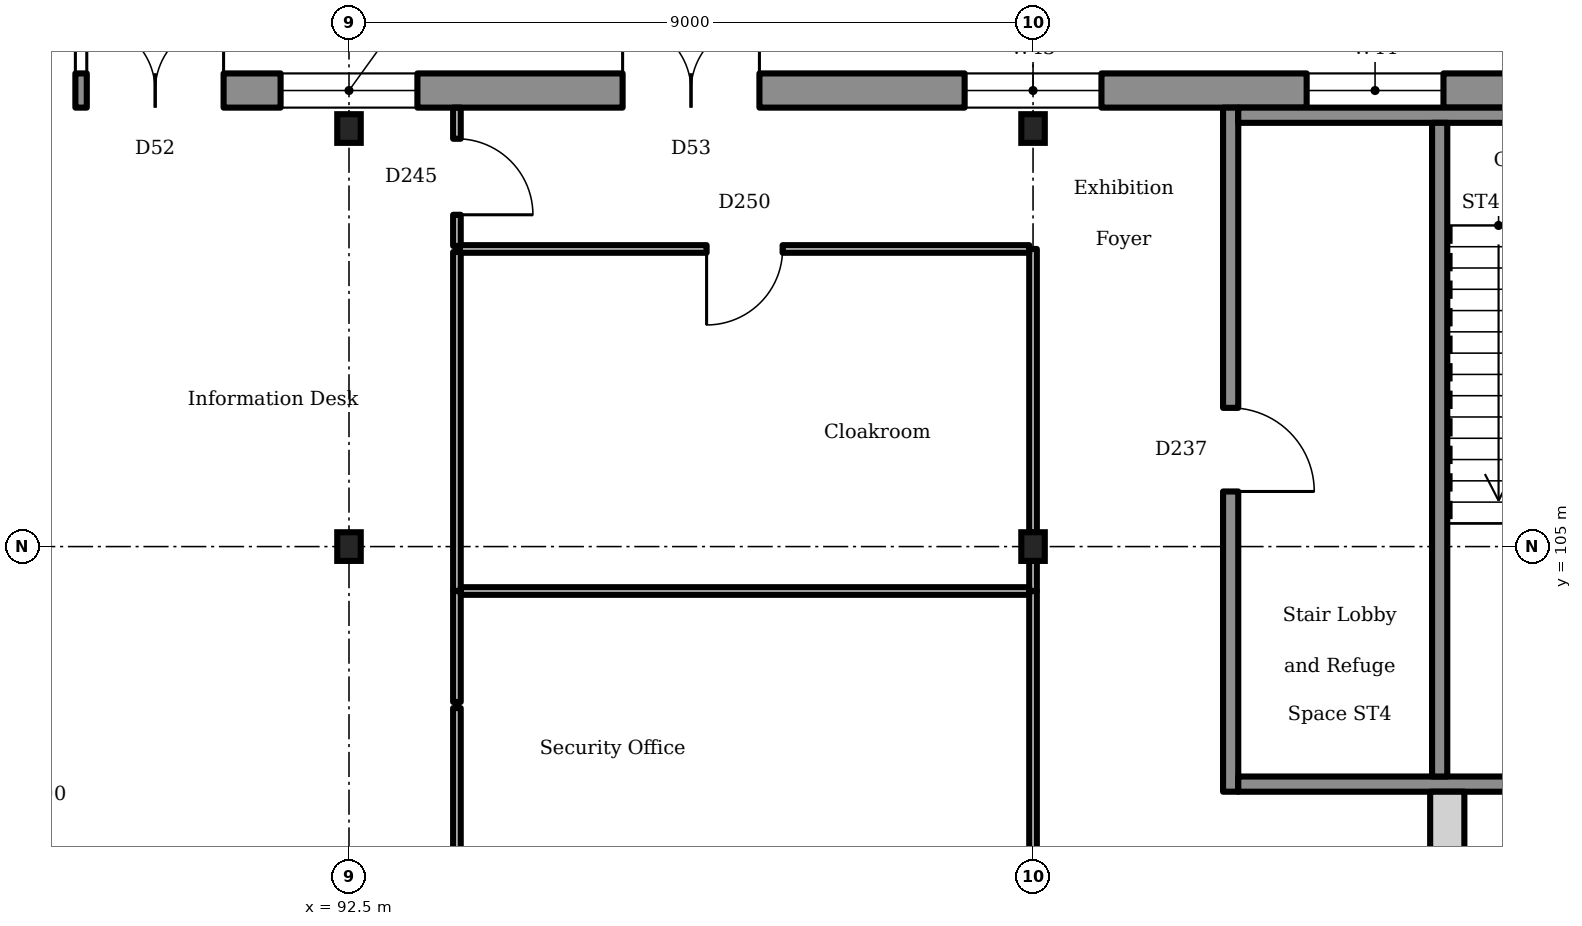
"""IFC4 building model, lengths in metres.
Left out: names, types, materials, properties, quantities, classifications, styles, units other than length and angle.
Written with IfcOpenShell. Run it as: python <this file> out.ifc"""

import sys

from ifc_helpers import new_model, si_unit, direction, frame, frame_2d, origin, origin_2d, place, context, subcontext, project, spatial, rectangle, i_section, extrude, element, fill, save


model = new_model("IFC4")
c1 = context("Model", 3, precision=1e-05, world=origin(), true_north=direction((0.0, 1.0)))
c2 = subcontext(c1, "Body", "Model", "MODEL_VIEW")
j1 = project(units=[si_unit("LENGTHUNIT", "METRE"), si_unit("PLANEANGLEUNIT", "RADIAN")], contexts=[c1])
p1 = place(None, origin())
s1 = spatial("IfcSite", under=j1, at=p1, CompositionType="ELEMENT")
p2 = place(p1, origin())
s2 = spatial("IfcBuilding", under=s1, at=p2, CompositionType="ELEMENT")
p3 = place(p2, origin())
s3 = spatial("IfcBuildingStorey", under=s2, at=p3, CompositionType="ELEMENT", Elevation=0.0)
for number, where, z_axis, x_axis in (
    (1, (92.5, 105.0, 0.0), (0.0, 0.0, 1.0), (1.0, 0.0, 0.0)),
    (2, (101.5, 105.0, 0.0), (0.0, 0.0, 1.0), (1.0, 0.0, 0.0)),
    (3, (92.5, 110.5, 0.0), (0.0, 0.0, 1.0), (1.0, 0.0, 0.0)),
    (4, (101.5, 110.5, 0.0), (0.0, 0.0, 1.0), (1.0, 0.0, 0.0)),
):
    element("IfcColumn", number, at=place(p3, frame(where, z_axis=z_axis, x_axis=x_axis)), inside=s3, PredefinedType="COLUMN", context=c2, shape_type="SweptSolid", body=[
        extrude(i_section(OverallWidth=0.309, OverallDepth=0.377, WebThickness=0.021, FlangeThickness=0.04, FilletRadius=0.027, at=origin_2d()), origin(), (0.0, 0.0, 1.0), 5.4),
    ])
p4 = place(p3, frame((65.5, 111.0, 0.0), z_axis=(0.0, 0.0, 1.0), x_axis=(1.0, 0.0, 0.0)))
e5 = element("IfcWall", 5, at=p4, inside=s3, PredefinedType="SOLIDWALL", context=c2, shape_type="SweptSolid", body=[
    extrude(rectangle(XDim=45.0, YDim=0.45, at=frame_2d((22.5, 0.0))), origin(), (0.0, 0.0, 1.0), 5.2),
])
p5 = place(p4, frame((12.6, 0.0, 0.0)))
e6 = element("IfcOpeningElement", 6, at=p5, cuts=e5, PredefinedType="OPENING", context=c2, shape_type="SweptSolid", body=[
    extrude(rectangle(XDim=1.8, YDim=3.0, at=frame_2d((0.9, 1.5))), frame((0.0, 0.235, 0.0), z_axis=(0.0, -1.0, 0.0), x_axis=(1.0, 0.0, 0.0)), (0.0, 0.0, 1.0), 0.47),
])
p6 = place(p4, frame((19.65, 0.0, 0.0)))
e7 = element("IfcOpeningElement", 7, at=p6, cuts=e5, PredefinedType="OPENING", context=c2, shape_type="SweptSolid", body=[
    extrude(rectangle(XDim=1.8, YDim=3.0, at=frame_2d((0.9, 1.5))), frame((0.0, 0.235, 0.0), z_axis=(0.0, -1.0, 0.0), x_axis=(1.0, 0.0, 0.0)), (0.0, 0.0, 1.0), 0.47),
])
p7 = place(p4, frame((21.6, 0.0, 0.0)))
e8 = element("IfcOpeningElement", 8, at=p7, cuts=e5, PredefinedType="OPENING", context=c2, shape_type="SweptSolid", body=[
    extrude(rectangle(XDim=1.8, YDim=3.0, at=frame_2d((0.9, 1.5))), frame((0.0, 0.235, 0.0), z_axis=(0.0, -1.0, 0.0), x_axis=(1.0, 0.0, 0.0)), (0.0, 0.0, 1.0), 0.47),
])
p8 = place(p4, frame((23.55, 0.0, 0.0)))
e9 = element("IfcOpeningElement", 9, at=p8, cuts=e5, PredefinedType="OPENING", context=c2, shape_type="SweptSolid", body=[
    extrude(rectangle(XDim=1.8, YDim=3.0, at=frame_2d((0.9, 1.5))), frame((0.0, 0.235, 0.0), z_axis=(0.0, -1.0, 0.0), x_axis=(1.0, 0.0, 0.0)), (0.0, 0.0, 1.0), 0.47),
])
p9 = place(p4, frame((30.6, 0.0, 0.0)))
e10 = element("IfcOpeningElement", 10, at=p9, cuts=e5, PredefinedType="OPENING", context=c2, shape_type="SweptSolid", body=[
    extrude(rectangle(XDim=1.8, YDim=3.0, at=frame_2d((0.9, 1.5))), frame((0.0, 0.235, 0.0), z_axis=(0.0, -1.0, 0.0), x_axis=(1.0, 0.0, 0.0)), (0.0, 0.0, 1.0), 0.47),
])
p10 = place(p4, frame((3.6, 0.0, 0.9)))
e11 = element("IfcOpeningElement", 11, at=p10, cuts=e5, PredefinedType="OPENING", context=c2, shape_type="SweptSolid", body=[
    extrude(rectangle(XDim=1.8, YDim=2.8, at=frame_2d((0.9, 1.4))), frame((0.0, 0.235, 0.0), z_axis=(0.0, -1.0, 0.0), x_axis=(1.0, 0.0, 0.0)), (0.0, 0.0, 1.0), 0.47),
])
p11 = place(p4, frame((8.1, 0.0, 0.9)))
e12 = element("IfcOpeningElement", 12, at=p11, cuts=e5, PredefinedType="OPENING", context=c2, shape_type="SweptSolid", body=[
    extrude(rectangle(XDim=1.8, YDim=2.8, at=frame_2d((0.9, 1.4))), frame((0.0, 0.235, 0.0), z_axis=(0.0, -1.0, 0.0), x_axis=(1.0, 0.0, 0.0)), (0.0, 0.0, 1.0), 0.47),
])
p12 = place(p4, frame((17.1, 0.0, 0.9)))
e13 = element("IfcOpeningElement", 13, at=p12, cuts=e5, PredefinedType="OPENING", context=c2, shape_type="SweptSolid", body=[
    extrude(rectangle(XDim=1.8, YDim=2.8, at=frame_2d((0.9, 1.4))), frame((0.0, 0.235, 0.0), z_axis=(0.0, -1.0, 0.0), x_axis=(1.0, 0.0, 0.0)), (0.0, 0.0, 1.0), 0.47),
])
p13 = place(p4, frame((26.1, 0.0, 0.9)))
e14 = element("IfcOpeningElement", 14, at=p13, cuts=e5, PredefinedType="OPENING", context=c2, shape_type="SweptSolid", body=[
    extrude(rectangle(XDim=1.8, YDim=2.8, at=frame_2d((0.9, 1.4))), frame((0.0, 0.235, 0.0), z_axis=(0.0, -1.0, 0.0), x_axis=(1.0, 0.0, 0.0)), (0.0, 0.0, 1.0), 0.47),
])
p14 = place(p4, frame((35.1, 0.0, 0.9)))
e15 = element("IfcOpeningElement", 15, at=p14, cuts=e5, PredefinedType="OPENING", context=c2, shape_type="SweptSolid", body=[
    extrude(rectangle(XDim=1.8, YDim=2.8, at=frame_2d((0.9, 1.4))), frame((0.0, 0.235, 0.0), z_axis=(0.0, -1.0, 0.0), x_axis=(1.0, 0.0, 0.0)), (0.0, 0.0, 1.0), 0.47),
])
p15 = place(p4, frame((39.6, 0.0, 0.9)))
e16 = element("IfcOpeningElement", 16, at=p15, cuts=e5, PredefinedType="OPENING", context=c2, shape_type="SweptSolid", body=[
    extrude(rectangle(XDim=1.8, YDim=2.8, at=frame_2d((0.9, 1.4))), frame((0.0, 0.235, 0.0), z_axis=(0.0, -1.0, 0.0), x_axis=(1.0, 0.0, 0.0)), (0.0, 0.0, 1.0), 0.47),
])
p16 = place(p3, frame((106.95, 96.0, 0.0), z_axis=(0.0, 0.0, 1.0), x_axis=(0.0, 1.0, 0.0)))
e17 = element("IfcWall", 17, at=p16, inside=s3, PredefinedType="SOLIDWALL", context=c2, shape_type="SweptSolid", body=[
    extrude(rectangle(XDim=5.775, YDim=0.45, at=frame_2d((2.887, 0.0))), origin(), (0.0, 0.0, 1.0), 5.2),
])
p17 = place(p16, frame((1.988, 0.0, 0.9)))
e18 = element("IfcOpeningElement", 18, at=p17, cuts=e17, PredefinedType="OPENING", context=c2, shape_type="SweptSolid", body=[
    extrude(rectangle(XDim=1.8, YDim=2.8, at=frame_2d((0.9, 1.4))), frame((0.0, 0.235, 0.0), z_axis=(0.0, -1.0, 0.0), x_axis=(1.0, 0.0, 0.0)), (0.0, 0.0, 1.0), 0.47),
])
p18 = place(p3, frame((104.1, 101.775, 0.0), z_axis=(0.0, 0.0, 1.0), x_axis=(0.0, 1.0, 0.0)))
e19 = element("IfcWall", 19, at=p18, inside=s3, PredefinedType="SOLIDWALL", context=c2, shape_type="SweptSolid", body=[
    extrude(rectangle(XDim=9.0, YDim=0.2, at=frame_2d((4.5, 0.0))), origin(), (0.0, 0.0, 1.0), 5.2),
])
p19 = place(p18, frame((3.95, 0.0, 0.0)))
e20 = element("IfcOpeningElement", 20, at=p19, cuts=e19, PredefinedType="OPENING", context=c2, shape_type="SweptSolid", body=[
    extrude(rectangle(XDim=1.1, YDim=2.1, at=frame_2d((0.55, 1.05))), frame((0.0, 0.11, 0.0), z_axis=(0.0, -1.0, 0.0), x_axis=(1.0, 0.0, 0.0)), (0.0, 0.0, 1.0), 0.22),
])
for number, where, z_axis, x_axis in (
    (21, (104.2, 101.875, 0.0), (0.0, 0.0, 1.0), (1.0, 0.0, 0.0)),
    (22, (104.2, 110.675, 0.0), (0.0, 0.0, 1.0), (1.0, 0.0, 0.0)),
):
    element("IfcWall", number, at=place(p3, frame(where, z_axis=z_axis, x_axis=x_axis)), inside=s3, PredefinedType="SOLIDWALL", context=c2, shape_type="SweptSolid", body=[
        extrude(rectangle(XDim=5.6, YDim=0.2, at=frame_2d((2.8, 0.0))), origin(), (0.0, 0.0, 1.0), 5.2),
    ])
p20 = place(p3, frame((106.85, 101.975, 0.0), z_axis=(0.0, 0.0, 1.0), x_axis=(0.0, 1.0, 0.0)))
e23 = element("IfcWall", 23, at=p20, inside=s3, PredefinedType="SOLIDWALL", context=c2, shape_type="SweptSolid", body=[
    extrude(rectangle(XDim=8.6, YDim=0.2, at=frame_2d((4.3, 0.0))), origin(), (0.0, 0.0, 1.0), 5.2),
])
p21 = place(p3, frame((93.92, 110.775, 0.0), z_axis=(0.0, 0.0, 1.0), x_axis=(0.0, -1.0, 0.0)))
e24 = element("IfcWall", 24, at=p21, inside=s3, PredefinedType="PARTITIONING", context=c2, shape_type="SweptSolid", body=[
    extrude(rectangle(XDim=1.819, YDim=0.1, at=frame_2d((0.91, 0.0))), origin(), (0.0, 0.0, 1.0), 4.76),
])
p22 = place(p21, frame((0.41, 0.0, 0.0)))
e25 = element("IfcOpeningElement", 25, at=p22, cuts=e24, PredefinedType="OPENING", context=c2, shape_type="SweptSolid", body=[
    extrude(rectangle(XDim=1.0, YDim=2.1, at=frame_2d((0.5, 1.05))), frame((0.0, 0.06, 0.0), z_axis=(0.0, -1.0, 0.0), x_axis=(1.0, 0.0, 0.0)), (0.0, 0.0, 1.0), 0.12),
])
p23 = place(p3, frame((93.92, 102.875, 0.0), z_axis=(0.0, 0.0, 1.0), x_axis=(0.0, -1.0, 0.0)))
e26 = element("IfcWall", 26, at=p23, inside=s3, PredefinedType="PARTITIONING", context=c2, shape_type="SweptSolid", body=[
    extrude(rectangle(XDim=2.96, YDim=0.1, at=frame_2d((1.48, 0.0))), origin(), (0.0, 0.0, 1.0), 5.2),
])
p24 = place(p3, frame((93.92, 108.875, 0.0), z_axis=(0.0, 0.0, 1.0), x_axis=(0.0, -1.0, 0.0)))
e27 = element("IfcWall", 27, at=p24, inside=s3, PredefinedType="PARTITIONING", context=c2, shape_type="SweptSolid", body=[
    extrude(rectangle(XDim=4.46, YDim=0.1, at=frame_2d((2.23, 0.0))), origin(), (0.0, 0.0, 1.0), 4.76),
])
p25 = place(p3, frame((93.92, 104.416, 0.0), z_axis=(0.0, 0.0, 1.0), x_axis=(0.0, -1.0, 0.0)))
e28 = element("IfcWall", 28, at=p25, inside=s3, PredefinedType="PARTITIONING", context=c2, shape_type="SweptSolid", body=[
    extrude(rectangle(XDim=1.46, YDim=0.1, at=frame_2d((0.73, 0.0))), origin(), (0.0, 0.0, 1.0), 5.2),
])
p26 = place(p3, frame((101.5, 99.966, 0.0), z_axis=(0.0, 0.0, 1.0), x_axis=(0.0, 1.0, 0.0)))
e29 = element("IfcWall", 29, at=p26, inside=s3, PredefinedType="PARTITIONING", context=c2, shape_type="SweptSolid", body=[
    extrude(rectangle(XDim=4.45, YDim=0.1, at=frame_2d((2.225, 0.0))), origin(), (0.0, 0.0, 1.0), 4.76),
])
p27 = place(p3, frame((101.5, 104.416, 0.0), z_axis=(0.0, 0.0, 1.0), x_axis=(0.0, 1.0, 0.0)))
e30 = element("IfcWall", 30, at=p27, inside=s3, PredefinedType="PARTITIONING", context=c2, shape_type="SweptSolid", body=[
    extrude(rectangle(XDim=0.396, YDim=0.1, at=frame_2d((0.198, 0.0))), origin(), (0.0, 0.0, 1.0), 4.76),
])
p28 = place(p3, frame((101.5, 105.188, 0.0), z_axis=(0.0, 0.0, 1.0), x_axis=(0.0, 1.0, 0.0)))
e31 = element("IfcWall", 31, at=p28, inside=s3, PredefinedType="PARTITIONING", context=c2, shape_type="SweptSolid", body=[
    extrude(rectangle(XDim=3.727, YDim=0.1, at=frame_2d((1.864, 0.0))), origin(), (0.0, 0.0, 1.0), 4.76),
])
p29 = place(p3, frame((101.45, 108.916, 0.0), z_axis=(0.0, 0.0, 1.0), x_axis=(-1.0, 0.0, 0.0)))
e32 = element("IfcWall", 32, at=p29, inside=s3, PredefinedType="PARTITIONING", context=c2, shape_type="SweptSolid", body=[
    extrude(rectangle(XDim=7.49, YDim=0.1, at=frame_2d((3.745, 0.0))), origin(), (0.0, 0.0, 1.0), 4.9),
])
p30 = place(p29, frame((3.245, 0.0, 0.0)))
e33 = element("IfcOpeningElement", 33, at=p30, cuts=e32, PredefinedType="OPENING", context=c2, shape_type="SweptSolid", body=[
    extrude(rectangle(XDim=1.0, YDim=2.1, at=frame_2d((0.5, 1.05))), frame((0.0, 0.06, 0.0), z_axis=(0.0, -1.0, 0.0), x_axis=(1.0, 0.0, 0.0)), (0.0, 0.0, 1.0), 0.12),
])
p31 = place(p3, frame((93.97, 104.416, 0.0), z_axis=(0.0, 0.0, 1.0), x_axis=(1.0, 0.0, 0.0)))
e34 = element("IfcWall", 34, at=p31, inside=s3, PredefinedType="PARTITIONING", context=c2, shape_type="SweptSolid", body=[
    extrude(rectangle(XDim=7.48, YDim=0.1, at=frame_2d((3.74, 0.0))), origin(), (0.0, 0.0, 1.0), 4.75),
])
p32 = place(p7, origin())
e35 = element("IfcDoor", 35, at=p32, inside=s3, OperationType="DOUBLE_DOOR_SINGLE_SWING", PredefinedType="DOOR", context=c2, shape_type="SweptSolid", body=[
    extrude(rectangle(XDim=1.8, YDim=3.0, at=frame_2d((0.9, 1.5))), frame((0.0, 0.025, 0.0), z_axis=(0.0, -1.0, 0.0), x_axis=(1.0, 0.0, 0.0)), (0.0, 0.0, 1.0), 0.05),
])
fill(e8, e35)
p33 = place(p8, origin())
e36 = element("IfcDoor", 36, at=p33, inside=s3, OperationType="DOUBLE_DOOR_SINGLE_SWING", PredefinedType="DOOR", context=c2, shape_type="SweptSolid", body=[
    extrude(rectangle(XDim=1.8, YDim=3.0, at=frame_2d((0.9, 1.5))), frame((0.0, 0.025, 0.0), z_axis=(0.0, -1.0, 0.0), x_axis=(1.0, 0.0, 0.0)), (0.0, 0.0, 1.0), 0.05),
])
fill(e9, e36)
p34 = place(p9, origin())
e37 = element("IfcDoor", 37, at=p34, inside=s3, OperationType="DOUBLE_DOOR_SINGLE_SWING", PredefinedType="DOOR", context=c2, shape_type="SweptSolid", body=[
    extrude(rectangle(XDim=1.8, YDim=3.0, at=frame_2d((0.9, 1.5))), frame((0.0, 0.025, 0.0), z_axis=(0.0, -1.0, 0.0), x_axis=(1.0, 0.0, 0.0)), (0.0, 0.0, 1.0), 0.05),
])
fill(e10, e37)
p35 = place(p13, origin())
e38 = element("IfcWindow", 38, at=p35, inside=s3, PartitioningType="SINGLE_PANEL", PredefinedType="WINDOW", context=c2, shape_type="SweptSolid", body=[
    extrude(rectangle(XDim=1.8, YDim=2.8, at=frame_2d((0.9, 1.4))), frame((0.0, 0.03, 0.0), z_axis=(0.0, -1.0, 0.0), x_axis=(1.0, 0.0, 0.0)), (0.0, 0.0, 1.0), 0.06),
])
fill(e14, e38)
p36 = place(p14, origin())
e39 = element("IfcWindow", 39, at=p36, inside=s3, PartitioningType="SINGLE_PANEL", PredefinedType="WINDOW", context=c2, shape_type="SweptSolid", body=[
    extrude(rectangle(XDim=1.8, YDim=2.8, at=frame_2d((0.9, 1.4))), frame((0.0, 0.03, 0.0), z_axis=(0.0, -1.0, 0.0), x_axis=(1.0, 0.0, 0.0)), (0.0, 0.0, 1.0), 0.06),
])
fill(e15, e39)
p37 = place(p15, origin())
e40 = element("IfcWindow", 40, at=p37, inside=s3, PartitioningType="SINGLE_PANEL", PredefinedType="WINDOW", context=c2, shape_type="SweptSolid", body=[
    extrude(rectangle(XDim=1.8, YDim=2.8, at=frame_2d((0.9, 1.4))), frame((0.0, 0.03, 0.0), z_axis=(0.0, -1.0, 0.0), x_axis=(1.0, 0.0, 0.0)), (0.0, 0.0, 1.0), 0.06),
])
fill(e16, e40)
p38 = place(p19, frame((1.1, 0.0, 0.0), z_axis=(0.0, 0.0, 1.0), x_axis=(-1.0, 0.0, 0.0)))
e41 = element("IfcDoor", 41, at=p38, inside=s3, OperationType="SINGLE_SWING_LEFT", PredefinedType="DOOR", context=c2, shape_type="SweptSolid", body=[
    extrude(rectangle(XDim=1.1, YDim=2.1, at=frame_2d((0.55, 1.05))), frame((0.0, 0.025, 0.0), z_axis=(0.0, -1.0, 0.0), x_axis=(1.0, 0.0, 0.0)), (0.0, 0.0, 1.0), 0.05),
])
fill(e20, e41)
p39 = place(p22, origin())
e42 = element("IfcDoor", 42, at=p39, inside=s3, OperationType="SINGLE_SWING_LEFT", PredefinedType="DOOR", context=c2, shape_type="SweptSolid", body=[
    extrude(rectangle(XDim=1.0, YDim=2.1, at=frame_2d((0.5, 1.05))), frame((0.0, 0.025, 0.0), z_axis=(0.0, -1.0, 0.0), x_axis=(1.0, 0.0, 0.0)), (0.0, 0.0, 1.0), 0.05),
])
fill(e25, e42)
p40 = place(p30, origin())
e43 = element("IfcDoor", 43, at=p40, inside=s3, OperationType="SINGLE_SWING_LEFT", PredefinedType="DOOR", context=c2, shape_type="SweptSolid", body=[
    extrude(rectangle(XDim=1.0, YDim=2.1, at=frame_2d((0.5, 1.05))), frame((0.0, 0.025, 0.0), z_axis=(0.0, -1.0, 0.0), x_axis=(1.0, 0.0, 0.0)), (0.0, 0.0, 1.0), 0.05),
])
fill(e33, e43)
save(model, sys.argv[1])
